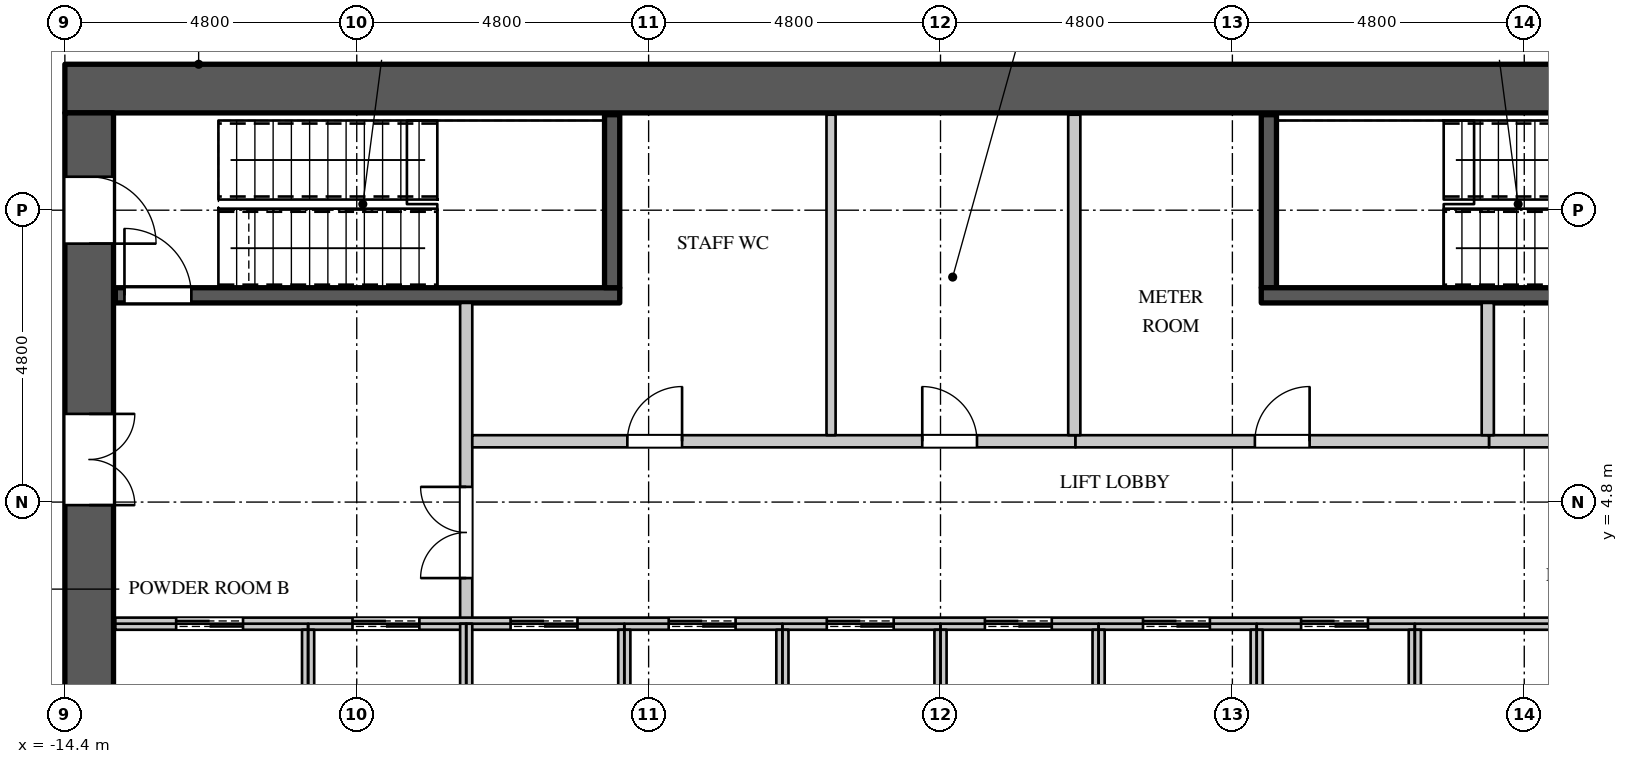
"""IFC4 building model, lengths in metres.
Left out: names, types, materials, properties, quantities, classifications, styles, units other than length and angle.
Written with IfcOpenShell. Run it as: python <this file> out.ifc"""

import sys

from ifc_helpers import new_model, si_unit, direction, frame, frame_2d, origin, place, context, subcontext, project, spatial, rectangle, extrude, element, fill, save


model = new_model("IFC4")
c1 = context("Model", 3, precision=1e-05, world=origin(), true_north=direction((0.0, 1.0)))
c2 = subcontext(c1, "Body", "Model", "MODEL_VIEW")
j1 = project(units=[si_unit("LENGTHUNIT", "METRE"), si_unit("PLANEANGLEUNIT", "RADIAN")], contexts=[c1])
p1 = place(None, origin())
s1 = spatial("IfcSite", under=j1, at=p1, CompositionType="ELEMENT")
p2 = place(p1, origin())
s2 = spatial("IfcBuilding", under=s1, at=p2, CompositionType="ELEMENT")
p3 = place(p2, frame((0.0, 0.0, 106.5)))
s3 = spatial("IfcBuildingStorey", under=s2, at=p3, CompositionType="ELEMENT", Elevation=106.5)
p4 = place(p3, frame((-14.4, 11.6, 0.0), z_axis=(0.0, 0.0, 1.0), x_axis=(1.0, 0.0, 0.0)))
e1 = element("IfcWall", 1, at=p4, inside=s3, PredefinedType="SHEAR", context=c2, shape_type="SweptSolid", body=[
    extrude(rectangle(XDim=28.8, YDim=0.8, at=frame_2d((14.4, 0.0))), origin(), (0.0, 0.0, 1.0), 4.2),
])
p5 = place(p3, frame((-14.0, -11.2, 0.0), z_axis=(0.0, 0.0, 1.0), x_axis=(0.0, 1.0, 0.0)))
e2 = element("IfcWall", 2, at=p5, inside=s3, PredefinedType="SHEAR", context=c2, shape_type="SweptSolid", body=[
    extrude(rectangle(XDim=22.4, YDim=0.8, at=frame_2d((11.2, 0.0))), origin(), (0.0, 0.0, 1.0), 4.2),
])
p6 = place(p5, frame((20.25, 0.0, 0.0)))
e3 = element("IfcOpeningElement", 3, at=p6, cuts=e2, PredefinedType="OPENING", context=c2, shape_type="SweptSolid", body=[
    extrude(rectangle(XDim=1.1, YDim=2.2, at=frame_2d((0.55, 1.1))), frame((0.0, 0.41, 0.0), z_axis=(0.0, -1.0, 0.0), x_axis=(1.0, 0.0, 0.0)), (0.0, 0.0, 1.0), 0.82),
])
p7 = place(p5, frame((1.05, 0.0, 0.0)))
e4 = element("IfcOpeningElement", 4, at=p7, cuts=e2, PredefinedType="OPENING", context=c2, shape_type="SweptSolid", body=[
    extrude(rectangle(XDim=1.1, YDim=2.2, at=frame_2d((0.55, 1.1))), frame((0.0, 0.41, 0.0), z_axis=(0.0, -1.0, 0.0), x_axis=(1.0, 0.0, 0.0)), (0.0, 0.0, 1.0), 0.82),
])
p8 = place(p5, frame((15.95, 0.0, 0.0)))
e5 = element("IfcOpeningElement", 5, at=p8, cuts=e2, PredefinedType="OPENING", context=c2, shape_type="SweptSolid", body=[
    extrude(rectangle(XDim=1.5, YDim=2.4, at=frame_2d((0.75, 1.2))), frame((0.0, 0.41, 0.0), z_axis=(0.0, -1.0, 0.0), x_axis=(1.0, 0.0, 0.0)), (0.0, 0.0, 1.0), 0.82),
])
p9 = place(p5, frame((4.95, 0.0, 0.0)))
e6 = element("IfcOpeningElement", 6, at=p9, cuts=e2, PredefinedType="OPENING", context=c2, shape_type="SweptSolid", body=[
    extrude(rectangle(XDim=1.5, YDim=2.4, at=frame_2d((0.75, 1.2))), frame((0.0, 0.41, 0.0), z_axis=(0.0, -1.0, 0.0), x_axis=(1.0, 0.0, 0.0)), (0.0, 0.0, 1.0), 0.82),
])
p10 = place(p3, frame((-7.8, 2.8, 0.0), z_axis=(0.0, 0.0, 1.0), x_axis=(0.0, 1.0, 0.0)))
e7 = element("IfcWall", 7, at=p10, inside=s3, PredefinedType="PARTITIONING", context=c2, shape_type="SweptSolid", body=[
    extrude(rectangle(XDim=5.275, YDim=0.2, at=frame_2d((2.637, 0.0))), origin(), (0.0, 0.0, 1.0), 3.95),
])
p11 = place(p10, frame((0.75, 0.0, 0.0)))
e8 = element("IfcOpeningElement", 8, at=p11, cuts=e7, PredefinedType="OPENING", context=c2, shape_type="SweptSolid", body=[
    extrude(rectangle(XDim=1.5, YDim=2.4, at=frame_2d((0.75, 1.2))), frame((0.0, 0.11, 0.0), z_axis=(0.0, -1.0, 0.0), x_axis=(1.0, 0.0, 0.0)), (0.0, 0.0, 1.0), 0.22),
])
p12 = place(p3, frame((-7.7, 5.8, 0.0), z_axis=(0.0, 0.0, 1.0), x_axis=(1.0, 0.0, 0.0)))
e9 = element("IfcWall", 9, at=p12, inside=s3, PredefinedType="PARTITIONING", context=c2, shape_type="SweptSolid", body=[
    extrude(rectangle(XDim=9.92, YDim=0.2, at=frame_2d((4.96, 0.0))), origin(), (0.0, 0.0, 1.0), 3.95),
])
p13 = place(p12, frame((2.55, 0.0, 0.0)))
e10 = element("IfcOpeningElement", 10, at=p13, cuts=e9, PredefinedType="OPENING", context=c2, shape_type="SweptSolid", body=[
    extrude(rectangle(XDim=0.9, YDim=2.2, at=frame_2d((0.45, 1.1))), frame((0.0, 0.11, 0.0), z_axis=(0.0, -1.0, 0.0), x_axis=(1.0, 0.0, 0.0)), (0.0, 0.0, 1.0), 0.22),
])
p14 = place(p12, frame((7.4, 0.0, 0.0)))
e11 = element("IfcOpeningElement", 11, at=p14, cuts=e9, PredefinedType="OPENING", context=c2, shape_type="SweptSolid", body=[
    extrude(rectangle(XDim=0.9, YDim=2.2, at=frame_2d((0.45, 1.1))), frame((0.0, 0.11, 0.0), z_axis=(0.0, -1.0, 0.0), x_axis=(1.0, 0.0, 0.0)), (0.0, 0.0, 1.0), 0.22),
])
p15 = place(p3, frame((9.02, 5.8, 0.0), z_axis=(0.0, 0.0, 1.0), x_axis=(1.0, 0.0, 0.0)))
e12 = element("IfcWall", 12, at=p15, inside=s3, PredefinedType="PARTITIONING", context=c2, shape_type="SweptSolid", body=[
    extrude(rectangle(XDim=4.55, YDim=0.2, at=frame_2d((2.275, 0.0))), origin(), (0.0, 0.0, 1.0), 3.95),
])
p16 = place(p15, frame((1.8, 0.0, 0.0)))
e13 = element("IfcOpeningElement", 13, at=p16, cuts=e12, PredefinedType="OPENING", context=c2, shape_type="SweptSolid", body=[
    extrude(rectangle(XDim=0.9, YDim=2.2, at=frame_2d((0.45, 1.1))), frame((0.0, 0.11, 0.0), z_axis=(0.0, -1.0, 0.0), x_axis=(1.0, 0.0, 0.0)), (0.0, 0.0, 1.0), 0.22),
])
p17 = place(p3, frame((-1.8, 5.9, 0.0), z_axis=(0.0, 0.0, 1.0), x_axis=(0.0, 1.0, 0.0)))
e14 = element("IfcWall", 14, at=p17, inside=s3, PredefinedType="PARTITIONING", context=c2, shape_type="SweptSolid", body=[
    extrude(rectangle(XDim=5.27, YDim=0.15, at=frame_2d((2.635, 0.0))), origin(), (0.0, 0.0, 1.0), 3.95),
])
p18 = place(p3, frame((2.22, 5.8, 0.0), z_axis=(0.0, 0.0, 1.0), x_axis=(1.0, 0.0, 0.0)))
e15 = element("IfcWall", 15, at=p18, inside=s3, PredefinedType="PARTITIONING", context=c2, shape_type="SweptSolid", body=[
    extrude(rectangle(XDim=6.8, YDim=0.2, at=frame_2d((3.4, 0.0))), origin(), (0.0, 0.0, 1.0), 3.95),
])
p19 = place(p18, frame((2.95, 0.0, 0.0)))
e16 = element("IfcOpeningElement", 16, at=p19, cuts=e15, PredefinedType="OPENING", context=c2, shape_type="SweptSolid", body=[
    extrude(rectangle(XDim=0.9, YDim=2.2, at=frame_2d((0.45, 1.1))), frame((0.0, 0.11, 0.0), z_axis=(0.0, -1.0, 0.0), x_axis=(1.0, 0.0, 0.0)), (0.0, 0.0, 1.0), 0.22),
])
p20 = place(p3, frame((2.2, 5.9, 0.0), z_axis=(0.0, 0.0, 1.0), x_axis=(0.0, 1.0, 0.0)))
e17 = element("IfcWall", 17, at=p20, inside=s3, PredefinedType="PARTITIONING", context=c2, shape_type="SweptSolid", body=[
    extrude(rectangle(XDim=5.27, YDim=0.2, at=frame_2d((2.635, 0.0))), origin(), (0.0, 0.0, 1.0), 3.95),
])
p21 = place(p3, frame((9.0, 5.9, 0.0), z_axis=(0.0, 0.0, 1.0), x_axis=(0.0, 1.0, 0.0)))
e18 = element("IfcWall", 18, at=p21, inside=s3, PredefinedType="PARTITIONING", context=c2, shape_type="SweptSolid", body=[
    extrude(rectangle(XDim=2.175, YDim=0.2, at=frame_2d((1.087, 0.0))), origin(), (0.0, 0.0, 1.0), 3.95),
])
p22 = place(p3, frame((-13.57, 2.8, 0.0), z_axis=(0.0, 0.0, 1.0), x_axis=(1.0, 0.0, 0.0)))
e19 = element("IfcWall", 19, at=p22, inside=s3, PredefinedType="PARTITIONING", context=c2, shape_type="SweptSolid", body=[
    extrude(rectangle(XDim=23.97, YDim=0.2, at=frame_2d((11.985, 0.0))), origin(), (0.0, 0.0, 1.0), 3.95),
])
p23 = place(p22, frame((1.0, 0.0, 0.0)))
e20 = element("IfcOpeningElement", 20, at=p23, cuts=e19, PredefinedType="OPENING", context=c2, shape_type="SweptSolid", body=[
    extrude(rectangle(XDim=1.1, YDim=2.2, at=frame_2d((0.55, 1.1))), frame((0.0, 0.11, 0.0), z_axis=(0.0, -1.0, 0.0), x_axis=(1.0, 0.0, 0.0)), (0.0, 0.0, 1.0), 0.22),
])
p24 = place(p22, frame((3.9, 0.0, 0.0)))
e21 = element("IfcOpeningElement", 21, at=p24, cuts=e19, PredefinedType="OPENING", context=c2, shape_type="SweptSolid", body=[
    extrude(rectangle(XDim=1.1, YDim=2.2, at=frame_2d((0.55, 1.1))), frame((0.0, 0.11, 0.0), z_axis=(0.0, -1.0, 0.0), x_axis=(1.0, 0.0, 0.0)), (0.0, 0.0, 1.0), 0.22),
])
p25 = place(p22, frame((6.5, 0.0, 0.0)))
e22 = element("IfcOpeningElement", 22, at=p25, cuts=e19, PredefinedType="OPENING", context=c2, shape_type="SweptSolid", body=[
    extrude(rectangle(XDim=1.1, YDim=2.2, at=frame_2d((0.55, 1.1))), frame((0.0, 0.11, 0.0), z_axis=(0.0, -1.0, 0.0), x_axis=(1.0, 0.0, 0.0)), (0.0, 0.0, 1.0), 0.22),
])
p26 = place(p22, frame((9.1, 0.0, 0.0)))
e23 = element("IfcOpeningElement", 23, at=p26, cuts=e19, PredefinedType="OPENING", context=c2, shape_type="SweptSolid", body=[
    extrude(rectangle(XDim=1.1, YDim=2.2, at=frame_2d((0.55, 1.1))), frame((0.0, 0.11, 0.0), z_axis=(0.0, -1.0, 0.0), x_axis=(1.0, 0.0, 0.0)), (0.0, 0.0, 1.0), 0.22),
])
p27 = place(p22, frame((11.7, 0.0, 0.0)))
e24 = element("IfcOpeningElement", 24, at=p27, cuts=e19, PredefinedType="OPENING", context=c2, shape_type="SweptSolid", body=[
    extrude(rectangle(XDim=1.1, YDim=2.2, at=frame_2d((0.55, 1.1))), frame((0.0, 0.11, 0.0), z_axis=(0.0, -1.0, 0.0), x_axis=(1.0, 0.0, 0.0)), (0.0, 0.0, 1.0), 0.22),
])
p28 = place(p22, frame((14.3, 0.0, 0.0)))
e25 = element("IfcOpeningElement", 25, at=p28, cuts=e19, PredefinedType="OPENING", context=c2, shape_type="SweptSolid", body=[
    extrude(rectangle(XDim=1.1, YDim=2.2, at=frame_2d((0.55, 1.1))), frame((0.0, 0.11, 0.0), z_axis=(0.0, -1.0, 0.0), x_axis=(1.0, 0.0, 0.0)), (0.0, 0.0, 1.0), 0.22),
])
p29 = place(p22, frame((16.9, 0.0, 0.0)))
e26 = element("IfcOpeningElement", 26, at=p29, cuts=e19, PredefinedType="OPENING", context=c2, shape_type="SweptSolid", body=[
    extrude(rectangle(XDim=1.1, YDim=2.2, at=frame_2d((0.55, 1.1))), frame((0.0, 0.11, 0.0), z_axis=(0.0, -1.0, 0.0), x_axis=(1.0, 0.0, 0.0)), (0.0, 0.0, 1.0), 0.22),
])
p30 = place(p22, frame((19.5, 0.0, 0.0)))
e27 = element("IfcOpeningElement", 27, at=p30, cuts=e19, PredefinedType="OPENING", context=c2, shape_type="SweptSolid", body=[
    extrude(rectangle(XDim=1.1, YDim=2.2, at=frame_2d((0.55, 1.1))), frame((0.0, 0.11, 0.0), z_axis=(0.0, -1.0, 0.0), x_axis=(1.0, 0.0, 0.0)), (0.0, 0.0, 1.0), 0.22),
])
p31 = place(p3, frame((-10.4, 0.0, 0.0), z_axis=(0.0, 0.0, 1.0), x_axis=(0.0, 1.0, 0.0)))
e28 = element("IfcWall", 28, at=p31, inside=s3, PredefinedType="PARTITIONING", context=c2, shape_type="SweptSolid", body=[
    extrude(rectangle(XDim=2.7, YDim=0.2, at=frame_2d((1.35, 0.0))), origin(), (0.0, 0.0, 1.0), 3.95),
])
p32 = place(p3, frame((-7.8, 0.0, 0.0), z_axis=(0.0, 0.0, 1.0), x_axis=(0.0, 1.0, 0.0)))
e29 = element("IfcWall", 29, at=p32, inside=s3, PredefinedType="PARTITIONING", context=c2, shape_type="SweptSolid", body=[
    extrude(rectangle(XDim=2.8, YDim=0.2, at=frame_2d((1.4, 0.0))), origin(), (0.0, 0.0, 1.0), 3.95),
])
for number, where, z_axis, x_axis in (
    (30, (-5.2, 0.1, 0.0), (0.0, 0.0, 1.0), (0.0, 1.0, 0.0)),
    (31, (-2.6, 0.1, 0.0), (0.0, 0.0, 1.0), (0.0, 1.0, 0.0)),
    (32, (0.0, 0.1, 0.0), (0.0, 0.0, 1.0), (0.0, 1.0, 0.0)),
    (33, (2.6, 0.1, 0.0), (0.0, 0.0, 1.0), (0.0, 1.0, 0.0)),
    (34, (5.2, 0.1, 0.0), (0.0, 0.0, 1.0), (0.0, 1.0, 0.0)),
):
    element("IfcWall", number, at=place(p3, frame(where, z_axis=z_axis, x_axis=x_axis)), inside=s3, PredefinedType="PARTITIONING", context=c2, shape_type="SweptSolid", body=[
        extrude(rectangle(XDim=2.6, YDim=0.2, at=frame_2d((1.3, 0.0))), origin(), (0.0, 0.0, 1.0), 3.95),
    ])
p33 = place(p3, frame((7.8, 0.0, 0.0), z_axis=(0.0, 0.0, 1.0), x_axis=(0.0, 1.0, 0.0)))
e35 = element("IfcWall", 35, at=p33, inside=s3, PredefinedType="PARTITIONING", context=c2, shape_type="SweptSolid", body=[
    extrude(rectangle(XDim=2.7, YDim=0.2, at=frame_2d((1.35, 0.0))), origin(), (0.0, 0.0, 1.0), 3.95),
])
p34 = place(p3, frame((-13.57, 8.2, 0.0), z_axis=(0.0, 0.0, 1.0), x_axis=(1.0, 0.0, 0.0)))
e36 = element("IfcWall", 36, at=p34, inside=s3, PredefinedType="SHEAR", context=c2, shape_type="SweptSolid", body=[
    extrude(rectangle(XDim=8.295, YDim=0.25, at=frame_2d((4.147, 0.0))), origin(), (0.0, 0.0, 1.0), 3.95),
])
p35 = place(p34, frame((0.15, 0.0, 0.0)))
e37 = element("IfcOpeningElement", 37, at=p35, cuts=e36, PredefinedType="OPENING", context=c2, shape_type="SweptSolid", body=[
    extrude(rectangle(XDim=1.1, YDim=2.2, at=frame_2d((0.55, 1.1))), frame((0.0, 0.135, 0.0), z_axis=(0.0, -1.0, 0.0), x_axis=(1.0, 0.0, 0.0)), (0.0, 0.0, 1.0), 0.27),
])
for number, where, z_axis, x_axis in (
    (38, (-5.4, 8.325, 0.0), (0.0, 0.0, 1.0), (0.0, 1.0, 0.0)),
    (39, (5.4, 8.325, 0.0), (0.0, 0.0, 1.0), (0.0, 1.0, 0.0)),
):
    element("IfcWall", number, at=place(p3, frame(where, z_axis=z_axis, x_axis=x_axis)), inside=s3, PredefinedType="SHEAR", context=c2, shape_type="SweptSolid", body=[
        extrude(rectangle(XDim=2.845, YDim=0.25, at=frame_2d((1.422, 0.0))), origin(), (0.0, 0.0, 1.0), 3.95),
    ])
p36 = place(p3, frame((5.275, 8.2, 0.0), z_axis=(0.0, 0.0, 1.0), x_axis=(1.0, 0.0, 0.0)))
e40 = element("IfcWall", 40, at=p36, inside=s3, PredefinedType="SHEAR", context=c2, shape_type="SweptSolid", body=[
    extrude(rectangle(XDim=8.295, YDim=0.25, at=frame_2d((4.147, 0.0))), origin(), (0.0, 0.0, 1.0), 3.95),
])
p37 = place(p13, origin())
e41 = element("IfcDoor", 41, at=p37, inside=s3, OperationType="SINGLE_SWING_RIGHT", PredefinedType="DOOR", context=c2, shape_type="SweptSolid", body=[
    extrude(rectangle(XDim=0.9, YDim=2.2, at=frame_2d((0.45, 1.1))), frame((0.0, 0.025, 0.0), z_axis=(0.0, -1.0, 0.0), x_axis=(1.0, 0.0, 0.0)), (0.0, 0.0, 1.0), 0.05),
])
fill(e10, e41)
p38 = place(p14, origin())
e42 = element("IfcDoor", 42, at=p38, inside=s3, OperationType="SINGLE_SWING_LEFT", PredefinedType="DOOR", context=c2, shape_type="SweptSolid", body=[
    extrude(rectangle(XDim=0.9, YDim=2.2, at=frame_2d((0.45, 1.1))), frame((0.0, 0.025, 0.0), z_axis=(0.0, -1.0, 0.0), x_axis=(1.0, 0.0, 0.0)), (0.0, 0.0, 1.0), 0.05),
])
fill(e11, e42)
p39 = place(p19, origin())
e43 = element("IfcDoor", 43, at=p39, inside=s3, OperationType="SINGLE_SWING_RIGHT", PredefinedType="DOOR", context=c2, shape_type="SweptSolid", body=[
    extrude(rectangle(XDim=0.9, YDim=2.2, at=frame_2d((0.45, 1.1))), frame((0.0, 0.025, 0.0), z_axis=(0.0, -1.0, 0.0), x_axis=(1.0, 0.0, 0.0)), (0.0, 0.0, 1.0), 0.05),
])
fill(e16, e43)
p40 = place(p23, origin())
e44 = element("IfcDoor", 44, at=p40, inside=s3, OperationType="DOUBLE_DOOR_SLIDING", PredefinedType="DOOR", context=c2, shape_type="SweptSolid", body=[
    extrude(rectangle(XDim=1.1, YDim=2.2, at=frame_2d((0.55, 1.1))), frame((0.0, 0.025, 0.0), z_axis=(0.0, -1.0, 0.0), x_axis=(1.0, 0.0, 0.0)), (0.0, 0.0, 1.0), 0.05),
])
fill(e20, e44)
p41 = place(p24, origin())
e45 = element("IfcDoor", 45, at=p41, inside=s3, OperationType="DOUBLE_DOOR_SLIDING", PredefinedType="DOOR", context=c2, shape_type="SweptSolid", body=[
    extrude(rectangle(XDim=1.1, YDim=2.2, at=frame_2d((0.55, 1.1))), frame((0.0, 0.025, 0.0), z_axis=(0.0, -1.0, 0.0), x_axis=(1.0, 0.0, 0.0)), (0.0, 0.0, 1.0), 0.05),
])
fill(e21, e45)
p42 = place(p25, origin())
e46 = element("IfcDoor", 46, at=p42, inside=s3, OperationType="DOUBLE_DOOR_SLIDING", PredefinedType="DOOR", context=c2, shape_type="SweptSolid", body=[
    extrude(rectangle(XDim=1.1, YDim=2.2, at=frame_2d((0.55, 1.1))), frame((0.0, 0.025, 0.0), z_axis=(0.0, -1.0, 0.0), x_axis=(1.0, 0.0, 0.0)), (0.0, 0.0, 1.0), 0.05),
])
fill(e22, e46)
p43 = place(p26, origin())
e47 = element("IfcDoor", 47, at=p43, inside=s3, OperationType="DOUBLE_DOOR_SLIDING", PredefinedType="DOOR", context=c2, shape_type="SweptSolid", body=[
    extrude(rectangle(XDim=1.1, YDim=2.2, at=frame_2d((0.55, 1.1))), frame((0.0, 0.025, 0.0), z_axis=(0.0, -1.0, 0.0), x_axis=(1.0, 0.0, 0.0)), (0.0, 0.0, 1.0), 0.05),
])
fill(e23, e47)
p44 = place(p27, origin())
e48 = element("IfcDoor", 48, at=p44, inside=s3, OperationType="DOUBLE_DOOR_SLIDING", PredefinedType="DOOR", context=c2, shape_type="SweptSolid", body=[
    extrude(rectangle(XDim=1.1, YDim=2.2, at=frame_2d((0.55, 1.1))), frame((0.0, 0.025, 0.0), z_axis=(0.0, -1.0, 0.0), x_axis=(1.0, 0.0, 0.0)), (0.0, 0.0, 1.0), 0.05),
])
fill(e24, e48)
p45 = place(p28, origin())
e49 = element("IfcDoor", 49, at=p45, inside=s3, OperationType="DOUBLE_DOOR_SLIDING", PredefinedType="DOOR", context=c2, shape_type="SweptSolid", body=[
    extrude(rectangle(XDim=1.1, YDim=2.2, at=frame_2d((0.55, 1.1))), frame((0.0, 0.025, 0.0), z_axis=(0.0, -1.0, 0.0), x_axis=(1.0, 0.0, 0.0)), (0.0, 0.0, 1.0), 0.05),
])
fill(e25, e49)
p46 = place(p29, origin())
e50 = element("IfcDoor", 50, at=p46, inside=s3, OperationType="DOUBLE_DOOR_SLIDING", PredefinedType="DOOR", context=c2, shape_type="SweptSolid", body=[
    extrude(rectangle(XDim=1.1, YDim=2.2, at=frame_2d((0.55, 1.1))), frame((0.0, 0.025, 0.0), z_axis=(0.0, -1.0, 0.0), x_axis=(1.0, 0.0, 0.0)), (0.0, 0.0, 1.0), 0.05),
])
fill(e26, e50)
p47 = place(p30, origin())
e51 = element("IfcDoor", 51, at=p47, inside=s3, OperationType="DOUBLE_DOOR_SLIDING", PredefinedType="DOOR", context=c2, shape_type="SweptSolid", body=[
    extrude(rectangle(XDim=1.1, YDim=2.2, at=frame_2d((0.55, 1.1))), frame((0.0, 0.025, 0.0), z_axis=(0.0, -1.0, 0.0), x_axis=(1.0, 0.0, 0.0)), (0.0, 0.0, 1.0), 0.05),
])
fill(e27, e51)
p48 = place(p35, origin())
e52 = element("IfcDoor", 52, at=p48, inside=s3, OperationType="SINGLE_SWING_LEFT", PredefinedType="DOOR", context=c2, shape_type="SweptSolid", body=[
    extrude(rectangle(XDim=1.1, YDim=2.2, at=frame_2d((0.55, 1.1))), frame((0.0, 0.025, 0.0), z_axis=(0.0, -1.0, 0.0), x_axis=(1.0, 0.0, 0.0)), (0.0, 0.0, 1.0), 0.05),
])
fill(e37, e52)
p49 = place(p11, origin())
e53 = element("IfcDoor", 53, at=p49, inside=s3, OperationType="DOUBLE_DOOR_SINGLE_SWING", PredefinedType="DOOR", context=c2, shape_type="SweptSolid", body=[
    extrude(rectangle(XDim=1.5, YDim=2.4, at=frame_2d((0.75, 1.2))), frame((0.0, 0.025, 0.0), z_axis=(0.0, -1.0, 0.0), x_axis=(1.0, 0.0, 0.0)), (0.0, 0.0, 1.0), 0.05),
])
fill(e8, e53)
p50 = place(p6, origin())
e54 = element("IfcDoor", 54, at=p50, inside=s3, OperationType="SINGLE_SWING_RIGHT", PredefinedType="DOOR", context=c2, shape_type="SweptSolid", body=[
    extrude(rectangle(XDim=1.1, YDim=2.2, at=frame_2d((0.55, 1.1))), frame((0.0, -0.345, 0.0), z_axis=(0.0, -1.0, 0.0), x_axis=(1.0, 0.0, 0.0)), (0.0, 0.0, 1.0), 0.05),
])
fill(e3, e54)
p51 = place(p8, origin())
e55 = element("IfcDoor", 55, at=p51, inside=s3, OperationType="DOUBLE_DOOR_SINGLE_SWING", PredefinedType="DOOR", context=c2, shape_type="SweptSolid", body=[
    extrude(rectangle(XDim=1.5, YDim=2.4, at=frame_2d((0.75, 1.2))), frame((0.0, -0.345, 0.0), z_axis=(0.0, -1.0, 0.0), x_axis=(1.0, 0.0, 0.0)), (0.0, 0.0, 1.0), 0.05),
])
fill(e5, e55)
save(model, sys.argv[1])
